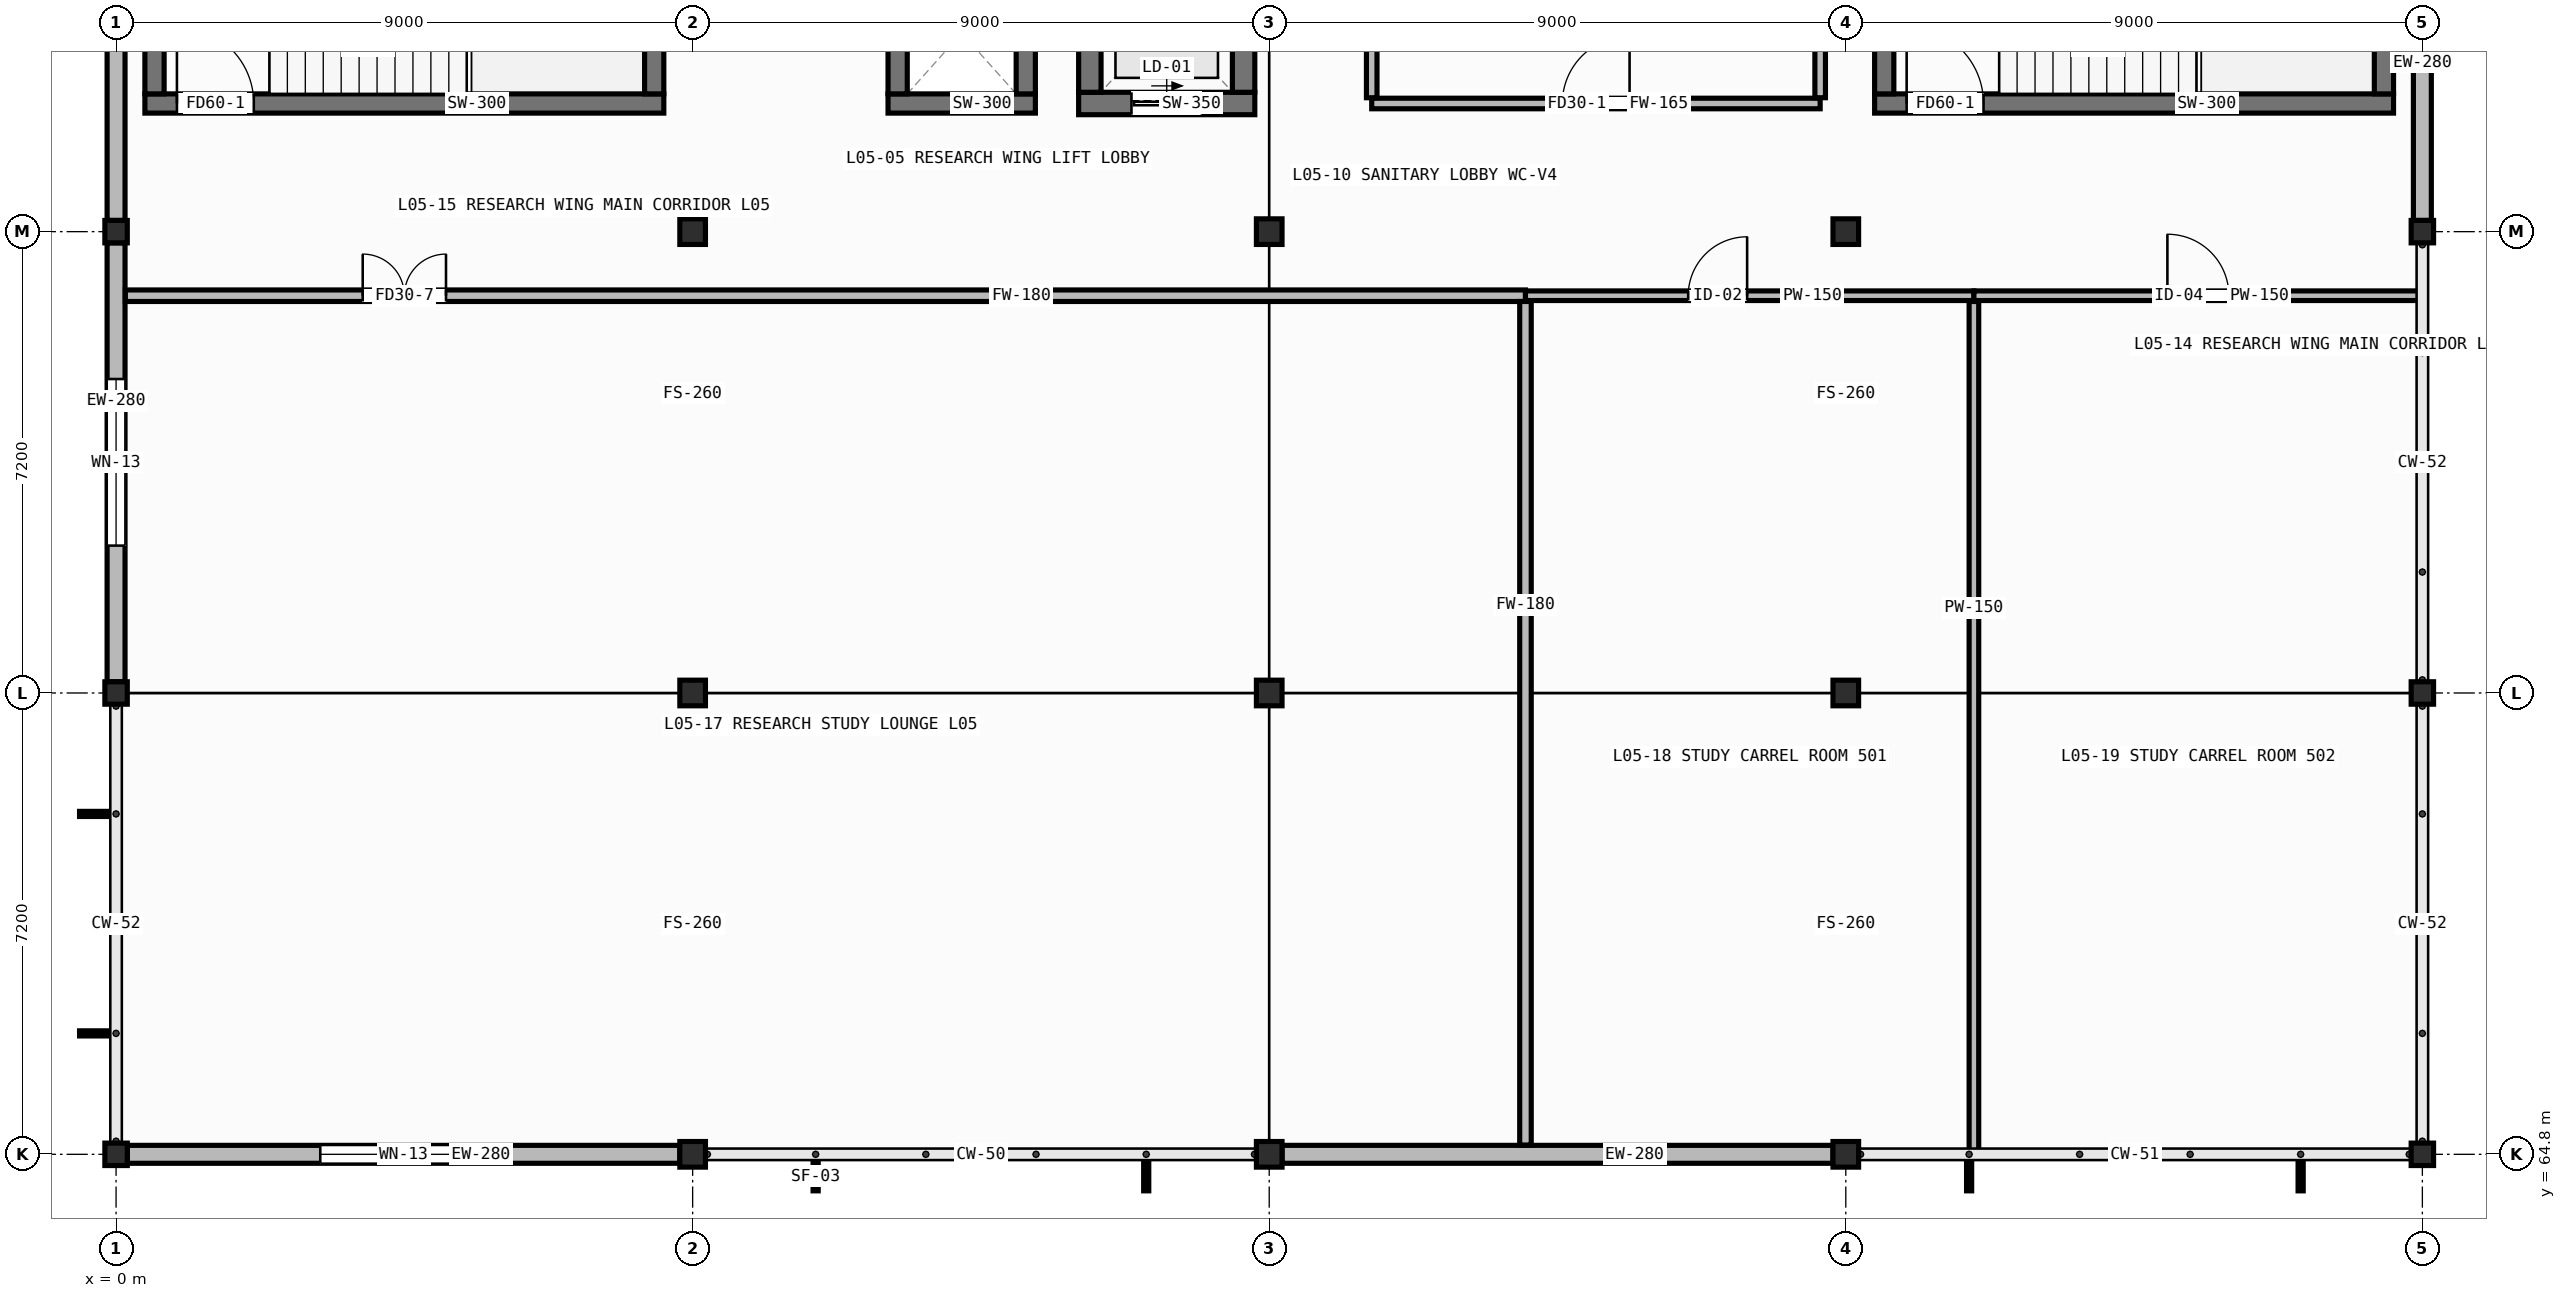
"""IFC4 building model, lengths in metres.
Left out: names, types, materials, properties, quantities, classifications, styles, units other than length and angle.
Written with IfcOpenShell. Run it as: python <this file> out.ifc"""

import sys

from ifc_helpers import new_model, si_unit, direction, frame, frame_2d, origin, origin_2d, place, context, subcontext, project, spatial, rectangle, hollow_rectangle, extrude, element, fill, save


model = new_model("IFC4")
c1 = context("Model", 3, precision=1e-05, world=origin(), true_north=direction((0.0, 1.0)))
c2 = subcontext(c1, "Body", "Model", "MODEL_VIEW")
j1 = project(units=[si_unit("LENGTHUNIT", "METRE"), si_unit("PLANEANGLEUNIT", "RADIAN")], contexts=[c1])
p1 = place(None, origin())
s1 = spatial("IfcSite", under=j1, at=p1, CompositionType="ELEMENT")
p2 = place(p1, origin())
s2 = spatial("IfcBuilding", under=s1, at=p2, CompositionType="ELEMENT")
p3 = place(p2, frame((0.0, 0.0, 17.0)))
s3 = spatial("IfcBuildingStorey", under=s2, at=p3, CompositionType="ELEMENT", Elevation=17.0)
for number, where, z_axis, x_axis in (
    (1, (0.0, 64.8, 0.0), (0.0, 0.0, 1.0), (1.0, 0.0, 0.0)),
    (2, (0.0, 72.0, 0.0), (0.0, 0.0, 1.0), (1.0, 0.0, 0.0)),
    (3, (0.0, 79.2, 0.0), (0.0, 0.0, 1.0), (1.0, 0.0, 0.0)),
):
    element("IfcColumn", number, at=place(p3, frame(where, z_axis=z_axis, x_axis=x_axis)), inside=s3, PredefinedType="COLUMN", context=c2, shape_type="SweptSolid", body=[
        extrude(hollow_rectangle(XDim=0.35, YDim=0.35, WallThickness=0.012, at=origin_2d()), origin(), (0.0, 0.0, 1.0), 3.6),
    ])
for number, where, z_axis, x_axis in (
    (4, (9.0, 64.8, 0.0), (0.0, 0.0, 1.0), (1.0, 0.0, 0.0)),
    (5, (9.0, 72.0, 0.0), (0.0, 0.0, 1.0), (1.0, 0.0, 0.0)),
    (6, (9.0, 79.2, 0.0), (0.0, 0.0, 1.0), (1.0, 0.0, 0.0)),
    (7, (18.0, 64.8, 0.0), (0.0, 0.0, 1.0), (1.0, 0.0, 0.0)),
    (8, (18.0, 72.0, 0.0), (0.0, 0.0, 1.0), (1.0, 0.0, 0.0)),
    (9, (18.0, 79.2, 0.0), (0.0, 0.0, 1.0), (1.0, 0.0, 0.0)),
    (10, (27.0, 64.8, 0.0), (0.0, 0.0, 1.0), (1.0, 0.0, 0.0)),
    (11, (27.0, 72.0, 0.0), (0.0, 0.0, 1.0), (1.0, 0.0, 0.0)),
    (12, (27.0, 79.2, 0.0), (0.0, 0.0, 1.0), (1.0, 0.0, 0.0)),
):
    element("IfcColumn", number, at=place(p3, frame(where, z_axis=z_axis, x_axis=x_axis)), inside=s3, PredefinedType="COLUMN", context=c2, shape_type="SweptSolid", body=[
        extrude(hollow_rectangle(XDim=0.4, YDim=0.4, WallThickness=0.016, at=origin_2d()), origin(), (0.0, 0.0, 1.0), 3.6),
    ])
for number, where, z_axis, x_axis in (
    (13, (36.0, 64.8, 0.0), (0.0, 0.0, 1.0), (1.0, 0.0, 0.0)),
    (14, (36.0, 72.0, 0.0), (0.0, 0.0, 1.0), (1.0, 0.0, 0.0)),
    (15, (36.0, 79.2, 0.0), (0.0, 0.0, 1.0), (1.0, 0.0, 0.0)),
):
    element("IfcColumn", number, at=place(p3, frame(where, z_axis=z_axis, x_axis=x_axis)), inside=s3, PredefinedType="COLUMN", context=c2, shape_type="SweptSolid", body=[
        extrude(hollow_rectangle(XDim=0.35, YDim=0.35, WallThickness=0.012, at=origin_2d()), origin(), (0.0, 0.0, 1.0), 3.6),
    ])
p4 = place(p3, frame((0.175, 64.8, 0.0), z_axis=(0.0, 0.0, 1.0), x_axis=(1.0, 0.0, 0.0)))
e16 = element("IfcWall", 16, at=p4, inside=s3, PredefinedType="STANDARD", context=c2, shape_type="SweptSolid", body=[
    extrude(rectangle(XDim=8.625, YDim=0.28, at=frame_2d((4.312, 0.0))), origin(), (0.0, 0.0, 1.0), 2.95),
])
p5 = place(p4, frame((3.012, 0.0, 0.85)))
e17 = element("IfcOpeningElement", 17, at=p5, cuts=e16, PredefinedType="OPENING", context=c2, shape_type="SweptSolid", body=[
    extrude(rectangle(XDim=2.6, YDim=1.6, at=frame_2d((1.3, 0.8))), frame((0.0, 0.152, 0.0), z_axis=(0.0, -1.0, 0.0), x_axis=(1.0, 0.0, 0.0)), (0.0, 0.0, 1.0), 0.304),
])
p6 = place(p3, frame((18.2, 64.8, 0.0), z_axis=(0.0, 0.0, 1.0), x_axis=(1.0, 0.0, 0.0)))
e18 = element("IfcWall", 18, at=p6, inside=s3, PredefinedType="STANDARD", context=c2, shape_type="SweptSolid", body=[
    extrude(rectangle(XDim=8.6, YDim=0.28, at=frame_2d((4.3, 0.0))), origin(), (0.0, 0.0, 1.0), 2.95),
])
p7 = place(p3, frame((0.0, 72.175, 0.0), z_axis=(0.0, 0.0, 1.0), x_axis=(0.0, 1.0, 0.0)))
e19 = element("IfcWall", 19, at=p7, inside=s3, PredefinedType="STANDARD", context=c2, shape_type="SweptSolid", body=[
    extrude(rectangle(XDim=6.85, YDim=0.28, at=frame_2d((3.425, 0.0))), origin(), (0.0, 0.0, 1.0), 2.94),
])
p8 = place(p7, frame((2.125, 0.0, 0.85)))
e20 = element("IfcOpeningElement", 20, at=p8, cuts=e19, PredefinedType="OPENING", context=c2, shape_type="SweptSolid", body=[
    extrude(rectangle(XDim=2.6, YDim=1.6, at=frame_2d((1.3, 0.8))), frame((0.0, 0.152, 0.0), z_axis=(0.0, -1.0, 0.0), x_axis=(1.0, 0.0, 0.0)), (0.0, 0.0, 1.0), 0.304),
])
for number, where, z_axis, x_axis in (
    (21, (0.0, 79.375, 0.0), (0.0, 0.0, 1.0), (0.0, 1.0, 0.0)),
    (22, (36.0, 86.225, 0.0), (0.0, 0.0, 1.0), (0.0, -1.0, 0.0)),
):
    element("IfcWall", number, at=place(p3, frame(where, z_axis=z_axis, x_axis=x_axis)), inside=s3, PredefinedType="STANDARD", context=c2, shape_type="SweptSolid", body=[
        extrude(rectangle(XDim=6.85, YDim=0.28, at=frame_2d((3.425, 0.0))), origin(), (0.0, 0.0, 1.0), 2.94),
    ])
p9 = place(p3, frame((0.45, 81.2, 0.0), z_axis=(0.0, 0.0, 1.0), x_axis=(1.0, 0.0, 0.0)))
e23 = element("IfcWall", 23, at=p9, inside=s3, PredefinedType="SHEAR", context=c2, shape_type="SweptSolid", body=[
    extrude(rectangle(XDim=8.1, YDim=0.3, at=frame_2d((4.05, 0.0))), origin(), (0.0, 0.0, 1.0), 3.34),
])
p10 = place(p9, frame((0.5, 0.0, 0.0)))
e24 = element("IfcOpeningElement", 24, at=p10, cuts=e23, PredefinedType="OPENING", context=c2, shape_type="SweptSolid", body=[
    extrude(rectangle(XDim=1.2, YDim=2.1, at=frame_2d((0.6, 1.05))), frame((0.0, 0.162, 0.0), z_axis=(0.0, -1.0, 0.0), x_axis=(1.0, 0.0, 0.0)), (0.0, 0.0, 1.0), 0.324),
])
for number, where, z_axis, x_axis in (
    (25, (0.6, 81.35, 0.0), (0.0, 0.0, 1.0), (0.0, 1.0, 0.0)),
    (26, (8.4, 81.35, 0.0), (0.0, 0.0, 1.0), (0.0, 1.0, 0.0)),
):
    element("IfcWall", number, at=place(p3, frame(where, z_axis=z_axis, x_axis=x_axis)), inside=s3, PredefinedType="SHEAR", context=c2, shape_type="SweptSolid", body=[
        extrude(rectangle(XDim=3.8, YDim=0.3, at=frame_2d((1.9, 0.0))), origin(), (0.0, 0.0, 1.0), 3.34),
    ])
p11 = place(p3, frame((27.45, 81.2, 0.0), z_axis=(0.0, 0.0, 1.0), x_axis=(1.0, 0.0, 0.0)))
e27 = element("IfcWall", 27, at=p11, inside=s3, PredefinedType="SHEAR", context=c2, shape_type="SweptSolid", body=[
    extrude(rectangle(XDim=8.1, YDim=0.3, at=frame_2d((4.05, 0.0))), origin(), (0.0, 0.0, 1.0), 3.34),
])
p12 = place(p11, frame((0.5, 0.0, 0.0)))
e28 = element("IfcOpeningElement", 28, at=p12, cuts=e27, PredefinedType="OPENING", context=c2, shape_type="SweptSolid", body=[
    extrude(rectangle(XDim=1.2, YDim=2.1, at=frame_2d((0.6, 1.05))), frame((0.0, 0.162, 0.0), z_axis=(0.0, -1.0, 0.0), x_axis=(1.0, 0.0, 0.0)), (0.0, 0.0, 1.0), 0.324),
])
for number, where, z_axis, x_axis in (
    (29, (27.6, 81.35, 0.0), (0.0, 0.0, 1.0), (0.0, 1.0, 0.0)),
    (30, (35.4, 81.35, 0.0), (0.0, 0.0, 1.0), (0.0, 1.0, 0.0)),
):
    element("IfcWall", number, at=place(p3, frame(where, z_axis=z_axis, x_axis=x_axis)), inside=s3, PredefinedType="SHEAR", context=c2, shape_type="SweptSolid", body=[
        extrude(rectangle(XDim=3.8, YDim=0.3, at=frame_2d((1.9, 0.0))), origin(), (0.0, 0.0, 1.0), 3.34),
    ])
p13 = place(p3, frame((15.025, 81.2, 0.0), z_axis=(0.0, 0.0, 1.0), x_axis=(1.0, 0.0, 0.0)))
e31 = element("IfcWall", 31, at=p13, inside=s3, PredefinedType="SHEAR", context=c2, shape_type="SweptSolid", body=[
    extrude(rectangle(XDim=2.75, YDim=0.35, at=frame_2d((1.375, 0.0))), origin(), (0.0, 0.0, 1.0), 3.34),
])
p14 = place(p13, frame((0.825, 0.0, 0.0)))
e32 = element("IfcOpeningElement", 32, at=p14, cuts=e31, PredefinedType="OPENING", context=c2, shape_type="SweptSolid", body=[
    extrude(rectangle(XDim=1.1, YDim=2.1, at=frame_2d((0.55, 1.05))), frame((0.0, 0.187, 0.0), z_axis=(0.0, -1.0, 0.0), x_axis=(1.0, 0.0, 0.0)), (0.0, 0.0, 1.0), 0.374),
])
for number, where, z_axis, x_axis in (
    (33, (15.2, 81.375, 0.0), (0.0, 0.0, 1.0), (0.0, 1.0, 0.0)),
    (34, (17.6, 81.375, 0.0), (0.0, 0.0, 1.0), (0.0, 1.0, 0.0)),
):
    element("IfcWall", number, at=place(p3, frame(where, z_axis=z_axis, x_axis=x_axis)), inside=s3, PredefinedType="SHEAR", context=c2, shape_type="SweptSolid", body=[
        extrude(rectangle(XDim=2.25, YDim=0.35, at=frame_2d((1.125, 0.0))), origin(), (0.0, 0.0, 1.0), 3.34),
    ])
p15 = place(p3, frame((12.05, 81.2, 0.0), z_axis=(0.0, 0.0, 1.0), x_axis=(1.0, 0.0, 0.0)))
e35 = element("IfcWall", 35, at=p15, inside=s3, PredefinedType="SHEAR", context=c2, shape_type="SweptSolid", body=[
    extrude(rectangle(XDim=2.3, YDim=0.3, at=frame_2d((1.15, 0.0))), origin(), (0.0, 0.0, 1.0), 3.34),
])
for number, where, z_axis, x_axis in (
    (36, (12.2, 81.35, 0.0), (0.0, 0.0, 1.0), (0.0, 1.0, 0.0)),
    (37, (14.2, 81.35, 0.0), (0.0, 0.0, 1.0), (0.0, 1.0, 0.0)),
):
    element("IfcWall", number, at=place(p3, frame(where, z_axis=z_axis, x_axis=x_axis)), inside=s3, PredefinedType="SHEAR", context=c2, shape_type="SweptSolid", body=[
        extrude(rectangle(XDim=1.9, YDim=0.3, at=frame_2d((0.95, 0.0))), origin(), (0.0, 0.0, 1.0), 3.34),
    ])
p16 = place(p3, frame((19.6, 81.2, 0.0), z_axis=(0.0, 0.0, 1.0), x_axis=(1.0, 0.0, 0.0)))
e38 = element("IfcWall", 38, at=p16, inside=s3, PredefinedType="PARTITIONING", context=c2, shape_type="SweptSolid", body=[
    extrude(rectangle(XDim=7.0, YDim=0.165, at=frame_2d((3.5, 0.0))), origin(), (0.0, 0.0, 1.0), 3.34),
])
p17 = place(p16, frame((2.975, 0.0, 0.0)))
e39 = element("IfcOpeningElement", 39, at=p17, cuts=e38, PredefinedType="OPENING", context=c2, shape_type="SweptSolid", body=[
    extrude(rectangle(XDim=1.05, YDim=2.1, at=frame_2d((0.525, 1.05))), frame((0.0, 0.094, 0.0), z_axis=(0.0, -1.0, 0.0), x_axis=(1.0, 0.0, 0.0)), (0.0, 0.0, 1.0), 0.189),
])
for number, where, z_axis, x_axis in (
    (40, (19.6, 81.29, 0.0), (0.0, 0.0, 1.0), (0.0, 1.0, 0.0)),
    (41, (26.6, 81.29, 0.0), (0.0, 0.0, 1.0), (0.0, 1.0, 0.0)),
):
    element("IfcWall", number, at=place(p3, frame(where, z_axis=z_axis, x_axis=x_axis)), inside=s3, PredefinedType="PARTITIONING", context=c2, shape_type="SweptSolid", body=[
        extrude(rectangle(XDim=2.22, YDim=0.165, at=frame_2d((1.11, 0.0))), origin(), (0.0, 0.0, 1.0), 3.34),
    ])
p18 = place(p3, frame((0.145, 78.2, 0.0), z_axis=(0.0, 0.0, 1.0), x_axis=(1.0, 0.0, 0.0)))
e42 = element("IfcWall", 42, at=p18, inside=s3, PredefinedType="PARTITIONING", context=c2, shape_type="SweptSolid", body=[
    extrude(rectangle(XDim=21.855, YDim=0.18, at=frame_2d((10.927, 0.0))), origin(), (0.0, 0.0, 1.0), 3.34),
])
p19 = place(p18, frame((3.705, 0.0, 0.0)))
e43 = element("IfcOpeningElement", 43, at=p19, cuts=e42, PredefinedType="OPENING", context=c2, shape_type="SweptSolid", body=[
    extrude(rectangle(XDim=1.3, YDim=2.08, at=frame_2d((0.65, 1.04))), frame((0.0, 0.102, 0.0), z_axis=(0.0, -1.0, 0.0), x_axis=(1.0, 0.0, 0.0)), (0.0, 0.0, 1.0), 0.204),
])
p20 = place(p3, frame((22.0, 64.945, 0.0), z_axis=(0.0, 0.0, 1.0), x_axis=(0.0, 1.0, 0.0)))
e44 = element("IfcWall", 44, at=p20, inside=s3, PredefinedType="PARTITIONING", context=c2, shape_type="SweptSolid", body=[
    extrude(rectangle(XDim=13.165, YDim=0.18, at=frame_2d((6.583, 0.0))), origin(), (0.0, 0.0, 1.0), 3.34),
])
p21 = place(p3, frame((22.0, 78.2, 0.0), z_axis=(0.0, 0.0, 1.0), x_axis=(1.0, 0.0, 0.0)))
e45 = element("IfcWall", 45, at=p21, inside=s3, PredefinedType="PARTITIONING", context=c2, shape_type="SweptSolid", body=[
    extrude(rectangle(XDim=7.0, YDim=0.15, at=frame_2d((3.5, 0.0))), origin(), (0.0, 0.0, 1.0), 3.34),
])
p22 = place(p21, frame((2.54, 0.0, 0.0)))
e46 = element("IfcOpeningElement", 46, at=p22, cuts=e45, PredefinedType="OPENING", context=c2, shape_type="SweptSolid", body=[
    extrude(rectangle(XDim=0.92, YDim=2.06, at=frame_2d((0.46, 1.03))), frame((0.0, 0.087, 0.0), z_axis=(0.0, -1.0, 0.0), x_axis=(1.0, 0.0, 0.0)), (0.0, 0.0, 1.0), 0.174),
])
p23 = place(p3, frame((29.0, 64.835, 0.0), z_axis=(0.0, 0.0, 1.0), x_axis=(0.0, 1.0, 0.0)))
e47 = element("IfcWall", 47, at=p23, inside=s3, PredefinedType="PARTITIONING", context=c2, shape_type="SweptSolid", body=[
    extrude(rectangle(XDim=13.275, YDim=0.15, at=frame_2d((6.638, 0.0))), origin(), (0.0, 0.0, 1.0), 3.34),
])
p24 = place(p3, frame((29.0, 78.2, 0.0), z_axis=(0.0, 0.0, 1.0), x_axis=(1.0, 0.0, 0.0)))
e48 = element("IfcWall", 48, at=p24, inside=s3, PredefinedType="PARTITIONING", context=c2, shape_type="SweptSolid", body=[
    extrude(rectangle(XDim=6.965, YDim=0.15, at=frame_2d((3.482, 0.0))), origin(), (0.0, 0.0, 1.0), 3.34),
])
p25 = place(p24, frame((3.02, 0.0, 0.0)))
e49 = element("IfcOpeningElement", 49, at=p25, cuts=e48, PredefinedType="OPENING", context=c2, shape_type="SweptSolid", body=[
    extrude(rectangle(XDim=0.96, YDim=2.1, at=frame_2d((0.48, 1.05))), frame((0.0, 0.087, 0.0), z_axis=(0.0, -1.0, 0.0), x_axis=(1.0, 0.0, 0.0)), (0.0, 0.0, 1.0), 0.174),
])
p26 = place(p5, origin())
e50 = element("IfcWindow", 50, at=p26, inside=s3, PartitioningType="DOUBLE_PANEL_VERTICAL", PredefinedType="WINDOW", context=c2, shape_type="SweptSolid", body=[
    extrude(rectangle(XDim=2.6, YDim=1.6, at=frame_2d((1.3, 0.8))), frame((0.0, 0.03, 0.0), z_axis=(0.0, -1.0, 0.0), x_axis=(1.0, 0.0, 0.0)), (0.0, 0.0, 1.0), 0.06),
])
fill(e17, e50)
p27 = place(p8, origin())
e51 = element("IfcWindow", 51, at=p27, inside=s3, PartitioningType="DOUBLE_PANEL_VERTICAL", PredefinedType="WINDOW", context=c2, shape_type="SweptSolid", body=[
    extrude(rectangle(XDim=2.6, YDim=1.6, at=frame_2d((1.3, 0.8))), frame((0.0, 0.03, 0.0), z_axis=(0.0, -1.0, 0.0), x_axis=(1.0, 0.0, 0.0)), (0.0, 0.0, 1.0), 0.06),
])
fill(e20, e51)
p28 = place(p10, origin())
e52 = element("IfcDoor", 52, at=p28, inside=s3, OperationType="SINGLE_SWING_LEFT", PredefinedType="DOOR", context=c2, shape_type="SweptSolid", body=[
    extrude(rectangle(XDim=1.2, YDim=2.1, at=frame_2d((0.6, 1.05))), frame((0.0, 0.025, 0.0), z_axis=(0.0, -1.0, 0.0), x_axis=(1.0, 0.0, 0.0)), (0.0, 0.0, 1.0), 0.05),
])
fill(e24, e52)
p29 = place(p12, origin())
e53 = element("IfcDoor", 53, at=p29, inside=s3, OperationType="SINGLE_SWING_LEFT", PredefinedType="DOOR", context=c2, shape_type="SweptSolid", body=[
    extrude(rectangle(XDim=1.2, YDim=2.1, at=frame_2d((0.6, 1.05))), frame((0.0, 0.025, 0.0), z_axis=(0.0, -1.0, 0.0), x_axis=(1.0, 0.0, 0.0)), (0.0, 0.0, 1.0), 0.05),
])
fill(e28, e53)
p30 = place(p14, origin())
e54 = element("IfcDoor", 54, at=p30, inside=s3, OperationType="SLIDING_TO_LEFT", PredefinedType="DOOR", context=c2, shape_type="SweptSolid", body=[
    extrude(rectangle(XDim=1.1, YDim=2.1, at=frame_2d((0.55, 1.05))), frame((0.0, 0.025, 0.0), z_axis=(0.0, -1.0, 0.0), x_axis=(1.0, 0.0, 0.0)), (0.0, 0.0, 1.0), 0.05),
])
fill(e32, e54)
p31 = place(p17, origin())
e55 = element("IfcDoor", 55, at=p31, inside=s3, OperationType="SINGLE_SWING_RIGHT", PredefinedType="DOOR", context=c2, shape_type="SweptSolid", body=[
    extrude(rectangle(XDim=1.05, YDim=2.1, at=frame_2d((0.525, 1.05))), frame((0.0, 0.025, 0.0), z_axis=(0.0, -1.0, 0.0), x_axis=(1.0, 0.0, 0.0)), (0.0, 0.0, 1.0), 0.05),
])
fill(e39, e55)
p32 = place(p19, origin())
e56 = element("IfcDoor", 56, at=p32, inside=s3, OperationType="DOUBLE_DOOR_SINGLE_SWING", PredefinedType="DOOR", context=c2, shape_type="SweptSolid", body=[
    extrude(rectangle(XDim=1.3, YDim=2.08, at=frame_2d((0.65, 1.04))), frame((0.0, 0.025, 0.0), z_axis=(0.0, -1.0, 0.0), x_axis=(1.0, 0.0, 0.0)), (0.0, 0.0, 1.0), 0.05),
])
fill(e43, e56)
p33 = place(p22, origin())
e57 = element("IfcDoor", 57, at=p33, inside=s3, OperationType="SINGLE_SWING_RIGHT", PredefinedType="DOOR", context=c2, shape_type="SweptSolid", body=[
    extrude(rectangle(XDim=0.92, YDim=2.06, at=frame_2d((0.46, 1.03))), frame((0.0, 0.025, 0.0), z_axis=(0.0, -1.0, 0.0), x_axis=(1.0, 0.0, 0.0)), (0.0, 0.0, 1.0), 0.05),
])
fill(e46, e57)
p34 = place(p25, origin())
e58 = element("IfcDoor", 58, at=p34, inside=s3, OperationType="SINGLE_SWING_LEFT", PredefinedType="DOOR", context=c2, shape_type="SweptSolid", body=[
    extrude(rectangle(XDim=0.96, YDim=2.1, at=frame_2d((0.48, 1.05))), frame((0.0, 0.025, 0.0), z_axis=(0.0, -1.0, 0.0), x_axis=(1.0, 0.0, 0.0)), (0.0, 0.0, 1.0), 0.05),
])
fill(e49, e58)
save(model, sys.argv[1])
